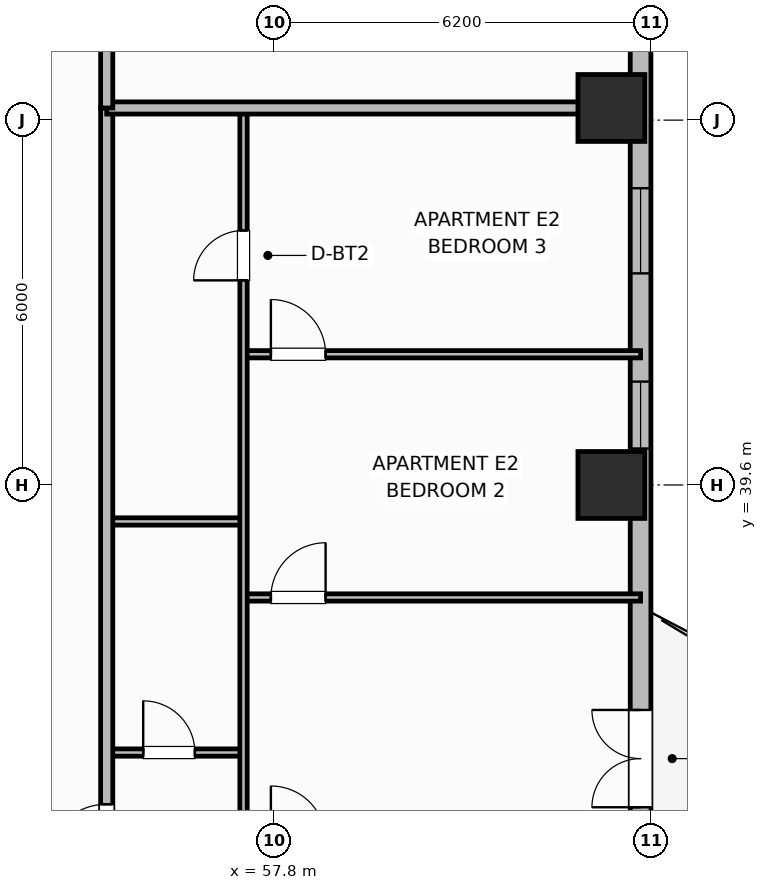
"""IFC4 building model, lengths in metres.
Left out: names, types, materials, properties, quantities, classifications, styles, units other than length and angle.
Written with IfcOpenShell. Run it as: python <this file> out.ifc"""

import sys

from ifc_helpers import new_model, si_unit, direction, frame, frame_2d, origin, origin_2d, place, context, subcontext, project, spatial, rectangle, extrude, element, fill, save


model = new_model("IFC4")
c1 = context("Model", 3, precision=1e-05, world=origin(), true_north=direction((0.0, 1.0)))
c2 = subcontext(c1, "Body", "Model", "MODEL_VIEW")
j1 = project(units=[si_unit("LENGTHUNIT", "METRE"), si_unit("PLANEANGLEUNIT", "RADIAN")], contexts=[c1])
p1 = place(None, origin())
s1 = spatial("IfcSite", under=j1, at=p1, CompositionType="ELEMENT")
p2 = place(p1, origin())
s2 = spatial("IfcBuilding", under=s1, at=p2, CompositionType="ELEMENT")
p3 = place(p2, frame((0.0, 0.0, 84.1)))
s3 = spatial("IfcBuildingStorey", under=s2, at=p3, CompositionType="ELEMENT", Elevation=84.1)
for number, where, z_axis, x_axis in (
    (1, (63.35, 39.6, 0.0), (0.0, 0.0, 1.0), (1.0, 0.0, 0.0)),
    (2, (63.35, 45.8, 0.0), (0.0, 0.0, 1.0), (1.0, 0.0, 0.0)),
):
    element("IfcColumn", number, at=place(p3, frame(where, z_axis=z_axis, x_axis=x_axis)), inside=s3, PredefinedType="COLUMN", context=c2, shape_type="SweptSolid", body=[
        extrude(rectangle(XDim=1.1, YDim=1.1, at=origin_2d()), origin(), (0.0, 0.0, 1.0), 4.2),
    ])
p4 = place(p3, frame((63.83, 32.6, 0.0), z_axis=(0.0, 0.0, 1.0), x_axis=(0.0, 1.0, 0.0)))
e3 = element("IfcWall", 3, at=p4, inside=s3, PredefinedType="SOLIDWALL", context=c2, shape_type="SweptSolid", body=[
    extrude(rectangle(XDim=14.8, YDim=0.34, at=frame_2d((7.4, 0.0))), origin(), (0.0, 0.0, 1.0), 3.2),
])
p5 = place(p4, frame((1.7, 0.0, 0.0)))
e4 = element("IfcOpeningElement", 4, at=p5, cuts=e3, PredefinedType="OPENING", context=c2, shape_type="SweptSolid", body=[
    extrude(rectangle(XDim=1.6, YDim=2.1, at=frame_2d((0.8, 1.05))), frame((0.0, 0.18, 0.0), z_axis=(0.0, -1.0, 0.0), x_axis=(1.0, 0.0, 0.0)), (0.0, 0.0, 1.0), 0.36),
])
p6 = place(p4, frame((7.6, 0.0, 0.95)))
e5 = element("IfcOpeningElement", 5, at=p6, cuts=e3, PredefinedType="OPENING", context=c2, shape_type="SweptSolid", body=[
    extrude(rectangle(XDim=1.1, YDim=1.65, at=frame_2d((0.55, 0.825))), frame((0.0, 0.18, 0.0), z_axis=(0.0, -1.0, 0.0), x_axis=(1.0, 0.0, 0.0)), (0.0, 0.0, 1.0), 0.36),
])
p7 = place(p4, frame((10.48, 0.0, 0.85)))
e6 = element("IfcOpeningElement", 6, at=p7, cuts=e3, PredefinedType="OPENING", context=c2, shape_type="SweptSolid", body=[
    extrude(rectangle(XDim=1.4, YDim=1.85, at=frame_2d((0.7, 0.925))), frame((0.0, 0.18, 0.0), z_axis=(0.0, -1.0, 0.0), x_axis=(1.0, 0.0, 0.0)), (0.0, 0.0, 1.0), 0.36),
])
p8 = place(p3, frame((55.05, 35.2, 0.0), z_axis=(0.0, 0.0, 1.0), x_axis=(1.0, 0.0, 0.0)))
e7 = element("IfcWall", 7, at=p8, inside=s3, PredefinedType="PARTITIONING", context=c2, shape_type="SweptSolid", body=[
    extrude(rectangle(XDim=2.25, YDim=0.12, at=frame_2d((1.125, 0.0))), origin(), (0.0, 0.0, 1.0), 3.03),
])
p9 = place(p8, frame((0.6, 0.0, 0.0)))
e8 = element("IfcOpeningElement", 8, at=p9, cuts=e7, PredefinedType="OPENING", context=c2, shape_type="SweptSolid", body=[
    extrude(rectangle(XDim=0.85, YDim=2.1, at=frame_2d((0.425, 1.05))), frame((0.0, 0.07, 0.0), z_axis=(0.0, -1.0, 0.0), x_axis=(1.0, 0.0, 0.0)), (0.0, 0.0, 1.0), 0.14),
])
p10 = place(p3, frame((55.05, 39.0, 0.0), z_axis=(0.0, 0.0, 1.0), x_axis=(1.0, 0.0, 0.0)))
e9 = element("IfcWall", 9, at=p10, inside=s3, PredefinedType="PARTITIONING", context=c2, shape_type="SweptSolid", body=[
    extrude(rectangle(XDim=2.25, YDim=0.12, at=frame_2d((1.125, 0.0))), origin(), (0.0, 0.0, 1.0), 3.03),
])
p11 = place(p3, frame((57.3, 37.75, 0.0), z_axis=(0.0, 0.0, 1.0), x_axis=(1.0, 0.0, 0.0)))
e10 = element("IfcWall", 10, at=p11, inside=s3, PredefinedType="PARTITIONING", context=c2, shape_type="SweptSolid", body=[
    extrude(rectangle(XDim=6.53, YDim=0.12, at=frame_2d((3.265, 0.0))), origin(), (0.0, 0.0, 1.0), 3.03),
])
p12 = place(p11, frame((0.45, 0.0, 0.0)))
e11 = element("IfcOpeningElement", 11, at=p12, cuts=e10, PredefinedType="OPENING", context=c2, shape_type="SweptSolid", body=[
    extrude(rectangle(XDim=0.9, YDim=2.1, at=frame_2d((0.45, 1.05))), frame((0.0, 0.07, 0.0), z_axis=(0.0, -1.0, 0.0), x_axis=(1.0, 0.0, 0.0)), (0.0, 0.0, 1.0), 0.14),
])
p13 = place(p3, frame((57.3, 41.75, 0.0), z_axis=(0.0, 0.0, 1.0), x_axis=(1.0, 0.0, 0.0)))
e12 = element("IfcWall", 12, at=p13, inside=s3, PredefinedType="PARTITIONING", context=c2, shape_type="SweptSolid", body=[
    extrude(rectangle(XDim=6.53, YDim=0.12, at=frame_2d((3.265, 0.0))), origin(), (0.0, 0.0, 1.0), 3.03),
])
p14 = place(p13, frame((0.45, 0.0, 0.0)))
e13 = element("IfcOpeningElement", 13, at=p14, cuts=e12, PredefinedType="OPENING", context=c2, shape_type="SweptSolid", body=[
    extrude(rectangle(XDim=0.9, YDim=2.1, at=frame_2d((0.45, 1.05))), frame((0.0, 0.07, 0.0), z_axis=(0.0, -1.0, 0.0), x_axis=(1.0, 0.0, 0.0)), (0.0, 0.0, 1.0), 0.14),
])
p15 = place(p3, frame((57.3, 29.84, 0.0), z_axis=(0.0, 0.0, 1.0), x_axis=(0.0, 1.0, 0.0)))
e14 = element("IfcWall", 14, at=p15, inside=s3, PredefinedType="PARTITIONING", context=c2, shape_type="SweptSolid", body=[
    extrude(rectangle(XDim=15.92, YDim=0.12, at=frame_2d((7.96, 0.0))), origin(), (0.0, 0.0, 1.0), 3.03),
])
p16 = place(p15, frame((0.41, 0.0, 0.0)))
e15 = element("IfcOpeningElement", 15, at=p16, cuts=e14, PredefinedType="OPENING", context=c2, shape_type="SweptSolid", body=[
    extrude(rectangle(XDim=0.9, YDim=2.1, at=frame_2d((0.45, 1.05))), frame((0.0, 0.07, 0.0), z_axis=(0.0, -1.0, 0.0), x_axis=(1.0, 0.0, 0.0)), (0.0, 0.0, 1.0), 0.14),
])
p17 = place(p15, frame((13.125, 0.0, 0.0)))
e16 = element("IfcOpeningElement", 16, at=p17, cuts=e14, PredefinedType="OPENING", context=c2, shape_type="SweptSolid", body=[
    extrude(rectangle(XDim=0.82, YDim=2.08, at=frame_2d((0.41, 1.04))), frame((0.0, 0.07, 0.0), z_axis=(0.0, -1.0, 0.0), x_axis=(1.0, 0.0, 0.0)), (0.0, 0.0, 1.0), 0.14),
])
p18 = place(p3, frame((55.05, 10.6, 0.0), z_axis=(0.0, 0.0, 1.0), x_axis=(0.0, 1.0, 0.0)))
e17 = element("IfcWall", 17, at=p18, inside=s3, PredefinedType="PARTITIONING", context=c2, shape_type="SweptSolid", body=[
    extrude(rectangle(XDim=35.2, YDim=0.2, at=frame_2d((17.6, 0.0))), origin(), (0.0, 0.0, 1.0), 3.03),
])
p19 = place(p18, frame((2.65, 0.0, 0.0)))
e18 = element("IfcOpeningElement", 18, at=p19, cuts=e17, PredefinedType="OPENING", context=c2, shape_type="SweptSolid", body=[
    extrude(rectangle(XDim=1.0, YDim=2.15, at=frame_2d((0.5, 1.075))), frame((0.0, 0.11, 0.0), z_axis=(0.0, -1.0, 0.0), x_axis=(1.0, 0.0, 0.0)), (0.0, 0.0, 1.0), 0.22),
])
p20 = place(p18, frame((22.75, 0.0, 0.0)))
e19 = element("IfcOpeningElement", 19, at=p20, cuts=e17, PredefinedType="OPENING", context=c2, shape_type="SweptSolid", body=[
    extrude(rectangle(XDim=1.0, YDim=2.15, at=frame_2d((0.5, 1.075))), frame((0.0, 0.11, 0.0), z_axis=(0.0, -1.0, 0.0), x_axis=(1.0, 0.0, 0.0)), (0.0, 0.0, 1.0), 0.22),
])
p21 = place(p3, frame((55.05, 45.8, 0.0), z_axis=(0.0, 0.0, 1.0), x_axis=(1.0, 0.0, 0.0)))
e20 = element("IfcWall", 20, at=p21, inside=s3, PredefinedType="PARTITIONING", context=c2, shape_type="SweptSolid", body=[
    extrude(rectangle(XDim=8.36, YDim=0.2, at=frame_2d((4.18, 0.0))), origin(), (0.0, 0.0, 1.0), 3.03),
])
p22 = place(p3, frame((55.05, 45.8, 0.0), z_axis=(0.0, 0.0, 1.0), x_axis=(0.0, 1.0, 0.0)))
e21 = element("IfcWall", 21, at=p22, inside=s3, PredefinedType="PARTITIONING", context=c2, shape_type="SweptSolid", body=[
    extrude(rectangle(XDim=5.63, YDim=0.2, at=frame_2d((2.815, 0.0))), origin(), (0.0, 0.0, 1.0), 3.03),
])
p23 = place(p5, origin())
e22 = element("IfcDoor", 22, at=p23, inside=s3, OperationType="DOUBLE_DOOR_SINGLE_SWING", PredefinedType="DOOR", context=c2, shape_type="SweptSolid", body=[
    extrude(rectangle(XDim=1.6, YDim=2.1, at=frame_2d((0.8, 1.05))), frame((0.0, 0.025, 0.0), z_axis=(0.0, -1.0, 0.0), x_axis=(1.0, 0.0, 0.0)), (0.0, 0.0, 1.0), 0.05),
])
fill(e4, e22)
p24 = place(p6, origin())
e23 = element("IfcWindow", 23, at=p24, inside=s3, PartitioningType="SINGLE_PANEL", PredefinedType="WINDOW", context=c2, shape_type="SweptSolid", body=[
    extrude(rectangle(XDim=1.1, YDim=1.65, at=frame_2d((0.55, 0.825))), frame((0.0, 0.03, 0.0), z_axis=(0.0, -1.0, 0.0), x_axis=(1.0, 0.0, 0.0)), (0.0, 0.0, 1.0), 0.06),
])
fill(e5, e23)
p25 = place(p7, origin())
e24 = element("IfcWindow", 24, at=p25, inside=s3, PartitioningType="SINGLE_PANEL", PredefinedType="WINDOW", context=c2, shape_type="SweptSolid", body=[
    extrude(rectangle(XDim=1.4, YDim=1.85, at=frame_2d((0.7, 0.925))), frame((0.0, 0.03, 0.0), z_axis=(0.0, -1.0, 0.0), x_axis=(1.0, 0.0, 0.0)), (0.0, 0.0, 1.0), 0.06),
])
fill(e6, e24)
p26 = place(p9, origin())
e25 = element("IfcDoor", 25, at=p26, inside=s3, OperationType="SINGLE_SWING_LEFT", PredefinedType="DOOR", context=c2, shape_type="SweptSolid", body=[
    extrude(rectangle(XDim=0.85, YDim=2.1, at=frame_2d((0.425, 1.05))), frame((0.0, 0.025, 0.0), z_axis=(0.0, -1.0, 0.0), x_axis=(1.0, 0.0, 0.0)), (0.0, 0.0, 1.0), 0.05),
])
fill(e8, e25)
p27 = place(p12, origin())
e26 = element("IfcDoor", 26, at=p27, inside=s3, OperationType="SINGLE_SWING_RIGHT", PredefinedType="DOOR", context=c2, shape_type="SweptSolid", body=[
    extrude(rectangle(XDim=0.9, YDim=2.1, at=frame_2d((0.45, 1.05))), frame((0.0, 0.025, 0.0), z_axis=(0.0, -1.0, 0.0), x_axis=(1.0, 0.0, 0.0)), (0.0, 0.0, 1.0), 0.05),
])
fill(e11, e26)
p28 = place(p14, origin())
e27 = element("IfcDoor", 27, at=p28, inside=s3, OperationType="SINGLE_SWING_LEFT", PredefinedType="DOOR", context=c2, shape_type="SweptSolid", body=[
    extrude(rectangle(XDim=0.9, YDim=2.1, at=frame_2d((0.45, 1.05))), frame((0.0, 0.025, 0.0), z_axis=(0.0, -1.0, 0.0), x_axis=(1.0, 0.0, 0.0)), (0.0, 0.0, 1.0), 0.05),
])
fill(e13, e27)
p29 = place(p17, origin())
e28 = element("IfcDoor", 28, at=p29, inside=s3, OperationType="SINGLE_SWING_LEFT", PredefinedType="DOOR", context=c2, shape_type="SweptSolid", body=[
    extrude(rectangle(XDim=0.82, YDim=2.08, at=frame_2d((0.41, 1.04))), frame((0.0, 0.025, 0.0), z_axis=(0.0, -1.0, 0.0), x_axis=(1.0, 0.0, 0.0)), (0.0, 0.0, 1.0), 0.05),
])
fill(e16, e28)
p30 = place(p20, origin())
e29 = element("IfcDoor", 29, at=p30, inside=s3, OperationType="SINGLE_SWING_LEFT", PredefinedType="DOOR", context=c2, shape_type="SweptSolid", body=[
    extrude(rectangle(XDim=1.0, YDim=2.15, at=frame_2d((0.5, 1.075))), frame((0.0, 0.025, 0.0), z_axis=(0.0, -1.0, 0.0), x_axis=(1.0, 0.0, 0.0)), (0.0, 0.0, 1.0), 0.05),
])
fill(e19, e29)
save(model, sys.argv[1])
